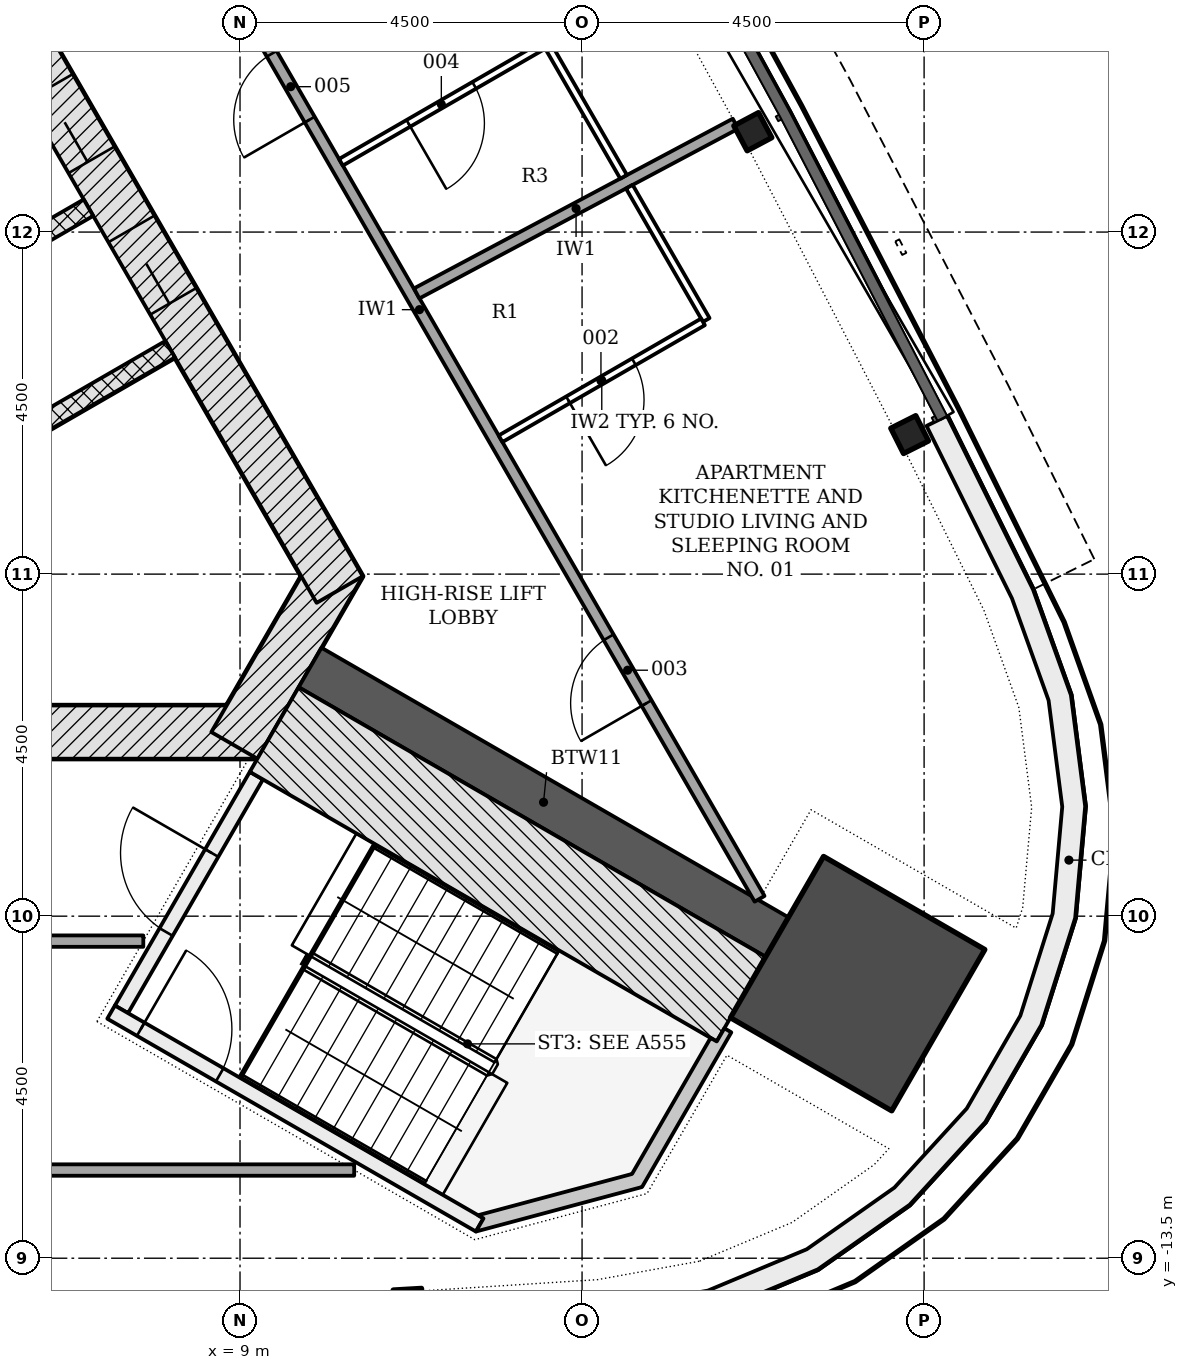
"""IFC4 building model, lengths in metres.
Left out: names, types, materials, properties, quantities, classifications, styles, units other than length and angle.
Written with IfcOpenShell. Run it as: python <this file> out.ifc"""

import sys

from ifc_helpers import new_model, si_unit, direction, frame, frame_2d, origin, origin_2d, place, context, subcontext, project, spatial, polyline, rectangle, i_section, outline, extrude, element, fill, save


model = new_model("IFC4")
c1 = context("Model", 3, precision=1e-05, world=origin(), true_north=direction((0.0, 1.0)))
c2 = subcontext(c1, "Body", "Model", "MODEL_VIEW")
j1 = project(units=[si_unit("LENGTHUNIT", "METRE"), si_unit("PLANEANGLEUNIT", "RADIAN")], contexts=[c1])
p1 = place(None, origin())
s1 = spatial("IfcSite", under=j1, at=p1, CompositionType="ELEMENT")
p2 = place(p1, origin())
s2 = spatial("IfcBuilding", under=s1, at=p2, CompositionType="ELEMENT")
p3 = place(p2, frame((0.0, 0.0, 240.0)))
s3 = spatial("IfcBuildingStorey", under=s2, at=p3, CompositionType="ELEMENT", Elevation=240.0)
p4 = place(p3, frame((-9.229, -6.578, -0.2), z_axis=(0.0, 0.0, 1.0), x_axis=(1.0, 0.0, 0.0)))
e1 = element("IfcWall", 1, at=p4, inside=s3, PredefinedType="SHEAR", context=c2, shape_type="SweptSolid", body=[
    extrude(rectangle(XDim=18.458, YDim=0.7, at=frame_2d((9.229, 0.0))), origin(), (0.0, 0.0, 1.0), 3.6),
])
p5 = place(p4, frame((9.5, 0.0, 0.2)))
e2 = element("IfcOpeningElement", 2, at=p5, cuts=e1, PredefinedType="OPENING", context=c2, shape_type="SweptSolid", body=[
    extrude(rectangle(XDim=1.0, YDim=2.1, at=frame_2d((0.5, 1.05))), frame((0.0, 0.36, 0.0), z_axis=(0.0, -1.0, 0.0), x_axis=(1.0, 0.0, 0.0)), (0.0, 0.0, 1.0), 0.72),
])
p6 = place(p4, frame((4.402, 0.0, 0.2)))
e3 = element("IfcOpeningElement", 3, at=p6, cuts=e1, PredefinedType="OPENING", context=c2, shape_type="SweptSolid", body=[
    extrude(rectangle(XDim=0.9, YDim=2.1, at=frame_2d((0.45, 1.05))), frame((0.0, 0.36, 0.0), z_axis=(0.0, -1.0, 0.0), x_axis=(1.0, 0.0, 0.0)), (0.0, 0.0, 1.0), 0.72),
])
p7 = place(p4, frame((13.927, 0.0, 0.2)))
e4 = element("IfcOpeningElement", 4, at=p7, cuts=e1, PredefinedType="OPENING", context=c2, shape_type="SweptSolid", body=[
    extrude(rectangle(XDim=0.9, YDim=2.1, at=frame_2d((0.45, 1.05))), frame((0.0, 0.36, 0.0), z_axis=(0.0, -1.0, 0.0), x_axis=(1.0, 0.0, 0.0)), (0.0, 0.0, 1.0), 0.72),
])
p8 = place(p3, frame((8.926, -6.753, -0.2), z_axis=(0.0, 0.0, 1.0), x_axis=(0.500042739161, 0.866000726912, 0.0)))
e5 = element("IfcWall", 5, at=p8, inside=s3, PredefinedType="SHEAR", context=c2, shape_type="SweptSolid", body=[
    extrude(rectangle(XDim=2.771, YDim=0.7, at=frame_2d((1.386, 0.0))), origin(), (0.0, 0.0, 1.0), 3.6),
])
p9 = place(p3, frame((10.311, -4.703, -0.2), z_axis=(0.0, 0.0, 1.0), x_axis=(-0.500001446645, 0.866024568562, 0.0)))
e6 = element("IfcWall", 6, at=p9, inside=s3, PredefinedType="SHEAR", context=c2, shape_type="SweptSolid", body=[
    extrude(rectangle(XDim=18.458, YDim=0.7, at=frame_2d((9.229, 0.0))), origin(), (0.0, 0.0, 1.0), 3.6),
])
p10 = place(p9, frame((4.379, 0.0, 0.2)))
e7 = element("IfcOpeningElement", 7, at=p10, cuts=e6, PredefinedType="OPENING", context=c2, shape_type="SweptSolid", body=[
    extrude(rectangle(XDim=1.1, YDim=2.1, at=frame_2d((0.55, 1.05))), frame((0.0, 0.36, 0.0), z_axis=(0.0, -1.0, 0.0), x_axis=(1.0, 0.0, 0.0)), (0.0, 0.0, 1.0), 0.72),
])
p11 = place(p9, frame((6.529, 0.0, 0.2)))
e8 = element("IfcOpeningElement", 8, at=p11, cuts=e6, PredefinedType="OPENING", context=c2, shape_type="SweptSolid", body=[
    extrude(rectangle(XDim=1.1, YDim=2.1, at=frame_2d((0.55, 1.05))), frame((0.0, 0.36, 0.0), z_axis=(0.0, -1.0, 0.0), x_axis=(1.0, 0.0, 0.0)), (0.0, 0.0, 1.0), 0.72),
])
p12 = place(p9, frame((8.679, 0.0, 0.2)))
e9 = element("IfcOpeningElement", 9, at=p12, cuts=e6, PredefinedType="OPENING", context=c2, shape_type="SweptSolid", body=[
    extrude(rectangle(XDim=1.1, YDim=2.1, at=frame_2d((0.55, 1.05))), frame((0.0, 0.36, 0.0), z_axis=(0.0, -1.0, 0.0), x_axis=(1.0, 0.0, 0.0)), (0.0, 0.0, 1.0), 0.72),
])
p13 = place(p9, frame((10.829, 0.0, 0.2)))
e10 = element("IfcOpeningElement", 10, at=p13, cuts=e6, PredefinedType="OPENING", context=c2, shape_type="SweptSolid", body=[
    extrude(rectangle(XDim=1.1, YDim=2.1, at=frame_2d((0.55, 1.05))), frame((0.0, 0.36, 0.0), z_axis=(0.0, -1.0, 0.0), x_axis=(1.0, 0.0, 0.0)), (0.0, 0.0, 1.0), 0.72),
])
p14 = place(p9, frame((12.979, 0.0, 0.2)))
e11 = element("IfcOpeningElement", 11, at=p14, cuts=e6, PredefinedType="OPENING", context=c2, shape_type="SweptSolid", body=[
    extrude(rectangle(XDim=1.1, YDim=2.1, at=frame_2d((0.55, 1.05))), frame((0.0, 0.36, 0.0), z_axis=(0.0, -1.0, 0.0), x_axis=(1.0, 0.0, 0.0)), (0.0, 0.0, 1.0), 0.72),
])
p15 = place(p3, frame((9.922, -5.728, -0.2), z_axis=(0.0, 0.0, 1.0), x_axis=(0.866029688112, -0.499992579254, 0.0)))
e12 = element("IfcWall", 12, at=p15, inside=s3, PredefinedType="SHEAR", context=c2, shape_type="SweptSolid", body=[
    extrude(rectangle(XDim=7.093, YDim=0.6, at=frame_2d((3.547, 0.0))), origin(), (0.0, 0.0, 1.0), 3.6),
])
p16 = place(p3, frame((17.126, -9.887, -0.2), z_axis=(0.0, 0.0, 1.0), x_axis=(0.866025403784, -0.5, 0.0)))
e13 = element("IfcColumn", 13, at=p16, inside=s3, PredefinedType="COLUMN", context=c2, shape_type="SweptSolid", body=[
    extrude(rectangle(XDim=2.45, YDim=2.45, at=origin_2d()), origin(), (0.0, 0.0, 1.0), 3.6),
])
for number, where, z_axis, x_axis in (
    (14, (11.212, -14.092, -0.2), (0.0, 0.0, 1.0), (0.998, 0.057, 0.0)),
    (15, (17.81, -2.665, -0.2), (0.0, 0.0, 1.0), (-0.45, 0.893, 0.0)),
    (16, (15.747, 1.32, -0.2), (0.0, 0.0, 1.0), (-0.47, 0.883, 0.0)),
):
    element("IfcColumn", number, at=place(p3, frame(where, z_axis=z_axis, x_axis=x_axis)), inside=s3, PredefinedType="COLUMN", context=c2, shape_type="SweptSolid", body=[
        extrude(i_section(OverallWidth=0.373, OverallDepth=0.368, WebThickness=0.015, FlangeThickness=0.024, FilletRadius=0.015, at=origin_2d()), origin(), (0.0, 0.0, 1.0), 3.6),
    ])
p17 = place(p3, origin())
e17 = element("IfcWall", 17, at=p17, inside=s3, PredefinedType="NOTDEFINED", context=c2, shape_type="SweptSolid", body=[
    extrude(outline(polyline([(11.244, -14.641), (13.789, -14.478), (15.241, -14.215), (16.602, -13.646), (17.809, -12.798), (18.804, -11.708), (19.542, -10.431), (19.987, -9.024), (20.119, -7.555), (19.931, -6.091), (19.433, -4.702), (18.301, -2.417), (18.032, -2.55), (19.156, -4.82), (19.638, -6.162), (19.817, -7.56), (19.691, -8.965), (19.266, -10.309), (18.561, -11.53), (17.609, -12.571), (16.456, -13.382), (15.155, -13.926), (13.752, -14.18), (11.225, -14.341), (11.244, -14.641)])), origin(), (0.0, 0.0, 1.0), 3.3),
])
for number, where, z_axis, x_axis in (
    (18, (8.081, -1.541, -0.2), (0.0, 0.0, 1.0), (-0.866, -0.5, 0.0)),
    (19, (7.006, 0.321, -0.2), (0.0, 0.0, 1.0), (-0.866, -0.5, 0.0)),
):
    element("IfcWall", number, at=place(p3, frame(where, z_axis=z_axis, x_axis=x_axis)), inside=s3, PredefinedType="PARTITIONING", context=c2, shape_type="SweptSolid", body=[
        extrude(rectangle(XDim=2.5, YDim=0.25, at=frame_2d((1.25, 0.0))), origin(), (0.0, 0.0, 1.0), 3.6),
    ])
p18 = place(p3, frame((7.44, -10.226, -0.2), z_axis=(0.0, 0.0, 1.0), x_axis=(0.500022077904, 0.866012656725, 0.0)))
e20 = element("IfcWall", 20, at=p18, inside=s3, PredefinedType="SHEAR", context=c2, shape_type="SweptSolid", body=[
    extrude(rectangle(XDim=3.55, YDim=0.2, at=frame_2d((1.775, 0.0))), origin(), (0.0, 0.0, 1.0), 3.6),
])
p19 = place(p18, frame((1.175, 0.0, 0.2)))
e21 = element("IfcOpeningElement", 21, at=p19, cuts=e20, PredefinedType="OPENING", context=c2, shape_type="SweptSolid", body=[
    extrude(rectangle(XDim=1.2, YDim=2.1, at=frame_2d((0.6, 1.05))), frame((0.0, 0.11, 0.0), z_axis=(0.0, -1.0, 0.0), x_axis=(1.0, 0.0, 0.0)), (0.0, 0.0, 1.0), 0.22),
])
p20 = place(p3, frame((7.304, -10.262, -0.2), z_axis=(0.0, 0.0, 1.0), x_axis=(0.866026594901, -0.49999793692, 0.0)))
e22 = element("IfcWall", 22, at=p20, inside=s3, PredefinedType="SHEAR", context=c2, shape_type="SweptSolid", body=[
    extrude(rectangle(XDim=5.6, YDim=0.2, at=frame_2d((2.8, 0.0))), origin(), (0.0, 0.0, 1.0), 3.6),
])
p21 = place(p20, frame((0.45, 0.0, 0.2)))
e23 = element("IfcOpeningElement", 23, at=p21, cuts=e22, PredefinedType="OPENING", context=c2, shape_type="SweptSolid", body=[
    extrude(rectangle(XDim=1.2, YDim=2.1, at=frame_2d((0.6, 1.05))), frame((0.0, 0.11, 0.0), z_axis=(0.0, -1.0, 0.0), x_axis=(1.0, 0.0, 0.0)), (0.0, 0.0, 1.0), 0.22),
])
p22 = place(p3, frame((9.45, -6.545, -0.2), z_axis=(0.0, 0.0, 1.0), x_axis=(0.866023389271, -0.500003489223, 0.0)))
e24 = element("IfcWall", 24, at=p22, inside=s3, PredefinedType="SHEAR", context=c2, shape_type="SweptSolid", body=[
    extrude(rectangle(XDim=7.094, YDim=1.286, at=frame_2d((3.547, 0.0))), origin(), (0.0, 0.0, 1.0), 3.6),
])
p23 = place(p3, frame((0.0, 0.0, -0.2)))
e25 = element("IfcWall", 25, at=p23, inside=s3, PredefinedType="SHEAR", context=c2, shape_type="SweptSolid", body=[
    extrude(outline(polyline([(12.104, -13.149), (14.289, -12.563), (15.464, -10.528), (15.372, -10.475), (15.272, -10.648), (15.272, -10.648), (15.272, -10.648), (15.272, -10.648), (15.272, -10.648), (15.272, -10.648), (15.272, -10.648), (15.272, -10.648), (15.272, -10.648), (15.272, -10.648), (15.272, -10.648), (15.272, -10.648), (15.272, -10.648), (15.272, -10.648), (15.272, -10.648), (15.272, -10.648), (15.272, -10.648), (15.191, -10.601), (14.157, -12.392), (12.132, -12.934), (12.204, -12.976), (12.204, -12.976), (12.204, -12.976), (12.204, -12.976), (12.204, -12.976), (12.204, -12.976), (12.204, -12.976), (12.204, -12.976), (12.204, -12.976), (12.204, -12.976), (12.204, -12.976), (12.204, -12.976), (12.204, -12.976), (12.204, -12.976), (12.204, -12.976), (12.204, -12.976), (12.204, -12.976), (12.104, -13.149)])), origin(), (0.0, 0.0, 1.0), 3.6),
])
p24 = place(p3, frame((15.836, -8.772, 0.0), z_axis=(0.0, 0.0, 1.0), x_axis=(-0.500001479768, 0.866024549438, 0.0)))
e26 = element("IfcWall", 26, at=p24, inside=s3, PredefinedType="PARTITIONING", context=c2, shape_type="SweptSolid", body=[
    extrude(rectangle(XDim=17.9, YDim=0.15, at=frame_2d((8.95, 0.0))), origin(), (0.0, 0.0, 1.0), 2.852),
])
p25 = place(p24, frame((2.973, 0.0, 0.0)))
e27 = element("IfcOpeningElement", 27, at=p25, cuts=e26, PredefinedType="OPENING", context=c2, shape_type="SweptSolid", body=[
    extrude(rectangle(XDim=1.0, YDim=2.1, at=frame_2d((0.5, 1.05))), frame((0.0, 0.085, 0.0), z_axis=(0.0, -1.0, 0.0), x_axis=(1.0, 0.0, 0.0)), (0.0, 0.0, 1.0), 0.17),
])
p26 = place(p24, frame((11.837, 0.0, 0.0)))
e28 = element("IfcOpeningElement", 28, at=p26, cuts=e26, PredefinedType="OPENING", context=c2, shape_type="SweptSolid", body=[
    extrude(rectangle(XDim=1.0, YDim=2.1, at=frame_2d((0.5, 1.05))), frame((0.0, 0.085, 0.0), z_axis=(0.0, -1.0, 0.0), x_axis=(1.0, 0.0, 0.0)), (0.0, 0.0, 1.0), 0.17),
])
p27 = place(p3, frame((14.122, 0.597, 0.0), z_axis=(0.0, 0.0, 1.0), x_axis=(0.499990325971, -0.866030989016, 0.0)))
e29 = element("IfcWall", 29, at=p27, inside=s3, PredefinedType="PARTITIONING", context=c2, shape_type="SweptSolid", body=[
    extrude(rectangle(XDim=2.025, YDim=0.1, at=frame_2d((1.012, 0.0))), origin(), (0.0, 0.0, 1.0), 2.852),
])
p28 = place(p3, frame((15.091, -1.182, 0.0), z_axis=(0.0, 0.0, 1.0), x_axis=(-0.866016353143, -0.500015675843, 0.0)))
e30 = element("IfcWall", 30, at=p28, inside=s3, PredefinedType="PARTITIONING", context=c2, shape_type="SweptSolid", body=[
    extrude(rectangle(XDim=3.075, YDim=0.1, at=frame_2d((1.538, 0.0))), origin(), (0.0, 0.0, 1.0), 3.4),
])
p29 = place(p28, frame((1.05, 0.0, 0.0)))
e31 = element("IfcOpeningElement", 31, at=p29, cuts=e30, PredefinedType="OPENING", context=c2, shape_type="SweptSolid", body=[
    extrude(rectangle(XDim=1.0, YDim=2.1, at=frame_2d((0.5, 1.05))), frame((0.0, 0.06, 0.0), z_axis=(0.0, -1.0, 0.0), x_axis=(1.0, 0.0, 0.0)), (0.0, 0.0, 1.0), 0.12),
])
p30 = place(p3, frame((15.518, 1.425, 0.0), z_axis=(0.0, 0.0, 1.0), x_axis=(-0.882718227231, -0.469902682812, 0.0)))
e32 = element("IfcWall", 32, at=p30, inside=s3, PredefinedType="PARTITIONING", context=c2, shape_type="SweptSolid", body=[
    extrude(rectangle(XDim=4.751, YDim=0.15, at=frame_2d((2.375, 0.0))), origin(), (0.0, 0.0, 1.0), 3.4),
])
p31 = place(p3, frame((14.047, 0.727, 0.0), z_axis=(0.0, 0.0, 1.0), x_axis=(-0.499990325971, 0.866030989016, 0.0)))
e33 = element("IfcWall", 33, at=p31, inside=s3, PredefinedType="PARTITIONING", context=c2, shape_type="SweptSolid", body=[
    extrude(rectangle(XDim=2.025, YDim=0.1, at=frame_2d((1.012, 0.0))), origin(), (0.0, 0.0, 1.0), 3.4),
])
p32 = place(p3, frame((12.991, 2.456, 0.0), z_axis=(0.0, 0.0, 1.0), x_axis=(-0.866030883713, -0.499990508365, 0.0)))
e34 = element("IfcWall", 34, at=p32, inside=s3, PredefinedType="PARTITIONING", context=c2, shape_type="SweptSolid", body=[
    extrude(rectangle(XDim=3.075, YDim=0.1, at=frame_2d((1.537, 0.0))), origin(), (0.0, 0.0, 1.0), 3.4),
])
p33 = place(p32, frame((1.05, 0.0, 0.0)))
e35 = element("IfcOpeningElement", 35, at=p33, cuts=e34, PredefinedType="OPENING", context=c2, shape_type="SweptSolid", body=[
    extrude(rectangle(XDim=1.0, YDim=2.1, at=frame_2d((0.5, 1.05))), frame((0.0, 0.06, 0.0), z_axis=(0.0, -1.0, 0.0), x_axis=(1.0, 0.0, 0.0)), (0.0, 0.0, 1.0), 0.12),
])
p34 = place(p3, frame((2.385, -9.328, 0.0), z_axis=(0.0, 0.0, 1.0), x_axis=(1.0, 0.0, 0.0)))
e36 = element("IfcWall", 36, at=p34, inside=s3, PredefinedType="PARTITIONING", context=c2, shape_type="SweptSolid", body=[
    extrude(rectangle(XDim=5.342, YDim=0.15, at=frame_2d((2.671, 0.0))), origin(), (0.0, 0.0, 1.0), 2.852),
])
p35 = place(p34, frame((2.196, 0.0, 0.0)))
e37 = element("IfcOpeningElement", 37, at=p35, cuts=e36, PredefinedType="OPENING", context=c2, shape_type="SweptSolid", body=[
    extrude(rectangle(XDim=1.0, YDim=2.1, at=frame_2d((0.5, 1.05))), frame((0.0, 0.085, 0.0), z_axis=(0.0, -1.0, 0.0), x_axis=(1.0, 0.0, 0.0)), (0.0, 0.0, 1.0), 0.17),
])
p36 = place(p3, frame((0.153, -12.34, 0.0), z_axis=(0.0, 0.0, 1.0), x_axis=(1.0, 0.0, 0.0)))
e38 = element("IfcWall", 38, at=p36, inside=s3, PredefinedType="PARTITIONING", context=c2, shape_type="SweptSolid", body=[
    extrude(rectangle(XDim=10.349, YDim=0.15, at=frame_2d((5.175, 0.0))), origin(), (0.0, 0.0, 1.0), 2.852),
])
p37 = place(p36, frame((0.625, 0.0, 0.0)))
e39 = element("IfcOpeningElement", 39, at=p37, cuts=e38, PredefinedType="OPENING", context=c2, shape_type="SweptSolid", body=[
    extrude(rectangle(XDim=1.0, YDim=2.1, at=frame_2d((0.5, 1.05))), frame((0.0, 0.085, 0.0), z_axis=(0.0, -1.0, 0.0), x_axis=(1.0, 0.0, 0.0)), (0.0, 0.0, 1.0), 0.17),
])
p38 = place(p10, origin())
e40 = element("IfcDoor", 40, at=p38, inside=s3, OperationType="DOUBLE_DOOR_SLIDING", PredefinedType="DOOR", context=c2, shape_type="SweptSolid", body=[
    extrude(rectangle(XDim=1.1, YDim=2.1, at=frame_2d((0.55, 1.05))), frame((0.0, 0.025, 0.0), z_axis=(0.0, -1.0, 0.0), x_axis=(1.0, 0.0, 0.0)), (0.0, 0.0, 1.0), 0.05),
])
fill(e7, e40)
p39 = place(p11, origin())
e41 = element("IfcDoor", 41, at=p39, inside=s3, OperationType="DOUBLE_DOOR_SLIDING", PredefinedType="DOOR", context=c2, shape_type="SweptSolid", body=[
    extrude(rectangle(XDim=1.1, YDim=2.1, at=frame_2d((0.55, 1.05))), frame((0.0, 0.025, 0.0), z_axis=(0.0, -1.0, 0.0), x_axis=(1.0, 0.0, 0.0)), (0.0, 0.0, 1.0), 0.05),
])
fill(e8, e41)
p40 = place(p19, origin())
e42 = element("IfcDoor", 42, at=p40, inside=s3, OperationType="SINGLE_SWING_RIGHT", PredefinedType="DOOR", context=c2, shape_type="SweptSolid", body=[
    extrude(rectangle(XDim=1.2, YDim=2.1, at=frame_2d((0.6, 1.05))), frame((0.0, 0.025, 0.0), z_axis=(0.0, -1.0, 0.0), x_axis=(1.0, 0.0, 0.0)), (0.0, 0.0, 1.0), 0.05),
])
fill(e21, e42)
p41 = place(p21, origin())
e43 = element("IfcDoor", 43, at=p41, inside=s3, OperationType="SINGLE_SWING_LEFT", PredefinedType="DOOR", context=c2, shape_type="SweptSolid", body=[
    extrude(rectangle(XDim=1.2, YDim=2.1, at=frame_2d((0.6, 1.05))), frame((0.0, 0.025, 0.0), z_axis=(0.0, -1.0, 0.0), x_axis=(1.0, 0.0, 0.0)), (0.0, 0.0, 1.0), 0.05),
])
fill(e23, e43)
p42 = place(p29, origin())
e44 = element("IfcDoor", 44, at=p42, inside=s3, OperationType="SINGLE_SWING_RIGHT", PredefinedType="DOOR", context=c2, shape_type="SweptSolid", body=[
    extrude(rectangle(XDim=1.0, YDim=2.1, at=frame_2d((0.5, 1.05))), frame((0.0, 0.025, 0.0), z_axis=(0.0, -1.0, 0.0), x_axis=(1.0, 0.0, 0.0)), (0.0, 0.0, 1.0), 0.05),
])
fill(e31, e44)
p43 = place(p25, origin())
e45 = element("IfcDoor", 45, at=p43, inside=s3, OperationType="SINGLE_SWING_LEFT", PredefinedType="DOOR", context=c2, shape_type="SweptSolid", body=[
    extrude(rectangle(XDim=1.0, YDim=2.1, at=frame_2d((0.5, 1.05))), frame((0.0, 0.025, 0.0), z_axis=(0.0, -1.0, 0.0), x_axis=(1.0, 0.0, 0.0)), (0.0, 0.0, 1.0), 0.05),
])
fill(e27, e45)
p44 = place(p33, origin())
e46 = element("IfcDoor", 46, at=p44, inside=s3, OperationType="SINGLE_SWING_RIGHT", PredefinedType="DOOR", context=c2, shape_type="SweptSolid", body=[
    extrude(rectangle(XDim=1.0, YDim=2.1, at=frame_2d((0.5, 1.05))), frame((0.0, 0.025, 0.0), z_axis=(0.0, -1.0, 0.0), x_axis=(1.0, 0.0, 0.0)), (0.0, 0.0, 1.0), 0.05),
])
fill(e35, e46)
p45 = place(p26, origin())
e47 = element("IfcDoor", 47, at=p45, inside=s3, OperationType="SINGLE_SWING_LEFT", PredefinedType="DOOR", context=c2, shape_type="SweptSolid", body=[
    extrude(rectangle(XDim=1.0, YDim=2.1, at=frame_2d((0.5, 1.05))), frame((0.0, 0.025, 0.0), z_axis=(0.0, -1.0, 0.0), x_axis=(1.0, 0.0, 0.0)), (0.0, 0.0, 1.0), 0.05),
])
fill(e28, e47)
save(model, sys.argv[1])
